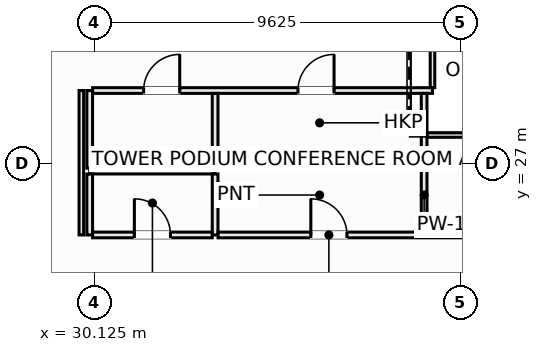
"""IFC4 building model, lengths in metres.
Left out: names, types, materials, properties, quantities, classifications, styles, units other than length and angle.
Written with IfcOpenShell. Run it as: python <this file> out.ifc"""

import sys

from ifc_helpers import new_model, si_unit, direction, frame, frame_2d, origin, place, context, subcontext, project, spatial, rectangle, extrude, element, fill, save


model = new_model("IFC4")
c1 = context("Model", 3, precision=1e-05, world=origin(), true_north=direction((0.0, 1.0)))
c2 = subcontext(c1, "Body", "Model", "MODEL_VIEW")
j1 = project(units=[si_unit("LENGTHUNIT", "METRE"), si_unit("PLANEANGLEUNIT", "RADIAN")], contexts=[c1])
p1 = place(None, origin())
s1 = spatial("IfcSite", under=j1, at=p1, CompositionType="ELEMENT")
p2 = place(p1, origin())
s2 = spatial("IfcBuilding", under=s1, at=p2, CompositionType="ELEMENT")
p3 = place(p2, frame((0.0, 0.0, 15.0)))
s3 = spatial("IfcBuildingStorey", under=s2, at=p3, CompositionType="ELEMENT", Elevation=15.0)
p4 = place(p3, frame((30.0, 26.8, 0.0), z_axis=(0.0, 0.0, 1.0), x_axis=(1.0, 0.0, 0.0)))
e1 = element("IfcWall", 1, at=p4, inside=s3, PredefinedType="PARTITIONING", context=c2, shape_type="SweptSolid", body=[
    extrude(rectangle(XDim=3.3, YDim=0.15, at=frame_2d((1.65, 0.0))), origin(), (0.0, 0.0, 1.0), 5.76),
])
p5 = place(p3, frame((30.0, 25.12, 0.0), z_axis=(0.0, 0.0, 1.0), x_axis=(0.0, 1.0, 0.0)))
e2 = element("IfcWall", 2, at=p5, inside=s3, PredefinedType="PARTITIONING", context=c2, shape_type="SweptSolid", body=[
    extrude(rectangle(XDim=1.603, YDim=0.15, at=frame_2d((0.801, 0.0))), origin(), (0.0, 0.0, 1.0), 5.76),
])
p6 = place(p3, frame((30.0, 26.877, 0.0), z_axis=(0.0, 0.0, 1.0), x_axis=(0.0, 1.0, 0.0)))
e3 = element("IfcWall", 3, at=p6, inside=s3, PredefinedType="PARTITIONING", context=c2, shape_type="SweptSolid", body=[
    extrude(rectangle(XDim=2.043, YDim=0.15, at=frame_2d((1.021, 0.0))), origin(), (0.0, 0.0, 1.0), 5.76),
])
p7 = place(p3, frame((30.077, 28.92, 0.0), z_axis=(0.0, 0.0, 1.0), x_axis=(1.0, 0.0, 0.0)))
e4 = element("IfcWall", 4, at=p7, inside=s3, PredefinedType="PARTITIONING", context=c2, shape_type="SweptSolid", body=[
    extrude(rectangle(XDim=8.943, YDim=0.15, at=frame_2d((4.472, 0.0))), origin(), (0.0, 0.0, 1.0), 5.76),
])
p8 = place(p7, frame((1.342, 0.0, 0.0)))
e5 = element("IfcOpeningElement", 5, at=p8, cuts=e4, PredefinedType="OPENING", context=c2, shape_type="SweptSolid", body=[
    extrude(rectangle(XDim=0.95, YDim=2.1, at=frame_2d((0.475, 1.05))), frame((0.0, 0.085, 0.0), z_axis=(0.0, -1.0, 0.0), x_axis=(1.0, 0.0, 0.0)), (0.0, 0.0, 1.0), 0.17),
])
p9 = place(p7, frame((5.403, 0.0, 0.0)))
e6 = element("IfcOpeningElement", 6, at=p9, cuts=e4, PredefinedType="OPENING", context=c2, shape_type="SweptSolid", body=[
    extrude(rectangle(XDim=0.95, YDim=2.1, at=frame_2d((0.475, 1.05))), frame((0.0, 0.085, 0.0), z_axis=(0.0, -1.0, 0.0), x_axis=(1.0, 0.0, 0.0)), (0.0, 0.0, 1.0), 0.17),
])
p10 = place(p3, frame((33.3, 25.12, 0.0), z_axis=(0.0, 0.0, 1.0), x_axis=(0.0, 1.0, 0.0)))
e7 = element("IfcWall", 7, at=p10, inside=s3, PredefinedType="PARTITIONING", context=c2, shape_type="SweptSolid", body=[
    extrude(rectangle(XDim=1.603, YDim=0.15, at=frame_2d((0.801, 0.0))), origin(), (0.0, 0.0, 1.0), 5.76),
])
p11 = place(p3, frame((33.3, 26.877, 0.0), z_axis=(0.0, 0.0, 1.0), x_axis=(0.0, 1.0, 0.0)))
e8 = element("IfcWall", 8, at=p11, inside=s3, PredefinedType="PARTITIONING", context=c2, shape_type="SweptSolid", body=[
    extrude(rectangle(XDim=1.966, YDim=0.15, at=frame_2d((0.983, 0.0))), origin(), (0.0, 0.0, 1.0), 5.76),
])
p12 = place(p3, frame((30.077, 25.12, 0.0), z_axis=(0.0, 0.0, 1.0), x_axis=(1.0, 0.0, 0.0)))
e9 = element("IfcWall", 9, at=p12, inside=s3, PredefinedType="PARTITIONING", context=c2, shape_type="SweptSolid", body=[
    extrude(rectangle(XDim=3.146, YDim=0.15, at=frame_2d((1.573, 0.0))), origin(), (0.0, 0.0, 1.0), 5.76),
])
p13 = place(p12, frame((1.098, 0.0, 0.0)))
e10 = element("IfcOpeningElement", 10, at=p13, cuts=e9, PredefinedType="OPENING", context=c2, shape_type="SweptSolid", body=[
    extrude(rectangle(XDim=0.95, YDim=2.1, at=frame_2d((0.475, 1.05))), frame((0.0, 0.085, 0.0), z_axis=(0.0, -1.0, 0.0), x_axis=(1.0, 0.0, 0.0)), (0.0, 0.0, 1.0), 0.17),
])
p14 = place(p3, frame((33.377, 25.12, 0.0), z_axis=(0.0, 0.0, 1.0), x_axis=(1.0, 0.0, 0.0)))
e11 = element("IfcWall", 11, at=p14, inside=s3, PredefinedType="PARTITIONING", context=c2, shape_type="SweptSolid", body=[
    extrude(rectangle(XDim=10.373, YDim=0.15, at=frame_2d((5.187, 0.0))), origin(), (0.0, 0.0, 1.0), 5.76),
])
p15 = place(p14, frame((2.441, 0.0, 0.0)))
e12 = element("IfcOpeningElement", 12, at=p15, cuts=e11, PredefinedType="OPENING", context=c2, shape_type="SweptSolid", body=[
    extrude(rectangle(XDim=0.95, YDim=2.1, at=frame_2d((0.475, 1.05))), frame((0.0, 0.085, 0.0), z_axis=(0.0, -1.0, 0.0), x_axis=(1.0, 0.0, 0.0)), (0.0, 0.0, 1.0), 0.17),
])
p16 = place(p3, frame((33.377, 27.22, 0.0), z_axis=(0.0, 0.0, 1.0), x_axis=(1.0, 0.0, 0.0)))
e13 = element("IfcWall", 13, at=p16, inside=s3, PredefinedType="PARTITIONING", context=c2, shape_type="SweptSolid", body=[
    extrude(rectangle(XDim=5.423, YDim=0.15, at=frame_2d((2.711, 0.0))), origin(), (0.0, 0.0, 1.0), 5.76),
])
p17 = place(p3, frame((38.8, 25.197, 0.0), z_axis=(0.0, 0.0, 1.0), x_axis=(0.0, 1.0, 0.0)))
e14 = element("IfcWall", 14, at=p17, inside=s3, PredefinedType="PARTITIONING", context=c2, shape_type="SweptSolid", body=[
    extrude(rectangle(XDim=1.946, YDim=0.15, at=frame_2d((0.973, 0.0))), origin(), (0.0, 0.0, 1.0), 5.76),
])
p18 = place(p3, frame((38.8, 27.297, 0.0), z_axis=(0.0, 0.0, 1.0), x_axis=(0.0, 1.0, 0.0)))
e15 = element("IfcWall", 15, at=p18, inside=s3, PredefinedType="PARTITIONING", context=c2, shape_type="SweptSolid", body=[
    extrude(rectangle(XDim=1.546, YDim=0.15, at=frame_2d((0.773, 0.0))), origin(), (0.0, 0.0, 1.0), 5.76),
])
p19 = place(p3, frame((29.78, 25.12, 0.0), z_axis=(0.0, 0.0, 1.0), x_axis=(0.0, 1.0, 0.0)))
e16 = element("IfcWall", 16, at=p19, inside=s3, PredefinedType="PARTITIONING", context=c2, shape_type="SweptSolid", body=[
    extrude(rectangle(XDim=3.8, YDim=0.12, at=frame_2d((1.9, 0.0))), origin(), (0.0, 0.0, 1.0), 5.76),
])
p20 = place(p3, frame((39.02, 28.997, 0.0), z_axis=(0.0, 0.0, 1.0), x_axis=(0.0, 1.0, 0.0)))
e17 = element("IfcWall", 17, at=p20, inside=s3, PredefinedType="PARTITIONING", context=c2, shape_type="SweptSolid", body=[
    extrude(rectangle(XDim=1.983, YDim=0.12, at=frame_2d((0.991, 0.0))), origin(), (0.0, 0.0, 1.0), 5.76),
])
p21 = place(p3, frame((38.877, 27.75, 0.0), z_axis=(0.0, 0.0, 1.0), x_axis=(1.0, 0.0, 0.0)))
e18 = element("IfcWall", 18, at=p21, inside=s3, PredefinedType="PARTITIONING", context=c2, shape_type="SweptSolid", body=[
    extrude(rectangle(XDim=5.723, YDim=0.12, at=frame_2d((2.862, 0.0))), origin(), (0.0, 0.0, 1.0), 5.76),
])
p22 = place(p8, origin())
e19 = element("IfcDoor", 19, at=p22, inside=s3, OperationType="SINGLE_SWING_RIGHT", PredefinedType="DOOR", context=c2, shape_type="SweptSolid", body=[
    extrude(rectangle(XDim=0.95, YDim=2.1, at=frame_2d((0.475, 1.05))), frame((0.0, 0.025, 0.0), z_axis=(0.0, -1.0, 0.0), x_axis=(1.0, 0.0, 0.0)), (0.0, 0.0, 1.0), 0.05),
])
fill(e5, e19)
p23 = place(p13, origin())
e20 = element("IfcDoor", 20, at=p23, inside=s3, OperationType="SINGLE_SWING_LEFT", PredefinedType="DOOR", context=c2, shape_type="SweptSolid", body=[
    extrude(rectangle(XDim=0.95, YDim=2.1, at=frame_2d((0.475, 1.05))), frame((0.0, 0.025, 0.0), z_axis=(0.0, -1.0, 0.0), x_axis=(1.0, 0.0, 0.0)), (0.0, 0.0, 1.0), 0.05),
])
fill(e10, e20)
p24 = place(p9, origin())
e21 = element("IfcDoor", 21, at=p24, inside=s3, OperationType="SINGLE_SWING_RIGHT", PredefinedType="DOOR", context=c2, shape_type="SweptSolid", body=[
    extrude(rectangle(XDim=0.95, YDim=2.1, at=frame_2d((0.475, 1.05))), frame((0.0, 0.025, 0.0), z_axis=(0.0, -1.0, 0.0), x_axis=(1.0, 0.0, 0.0)), (0.0, 0.0, 1.0), 0.05),
])
fill(e6, e21)
p25 = place(p15, origin())
e22 = element("IfcDoor", 22, at=p25, inside=s3, OperationType="SINGLE_SWING_LEFT", PredefinedType="DOOR", context=c2, shape_type="SweptSolid", body=[
    extrude(rectangle(XDim=0.95, YDim=2.1, at=frame_2d((0.475, 1.05))), frame((0.0, 0.025, 0.0), z_axis=(0.0, -1.0, 0.0), x_axis=(1.0, 0.0, 0.0)), (0.0, 0.0, 1.0), 0.05),
])
fill(e12, e22)
save(model, sys.argv[1])
